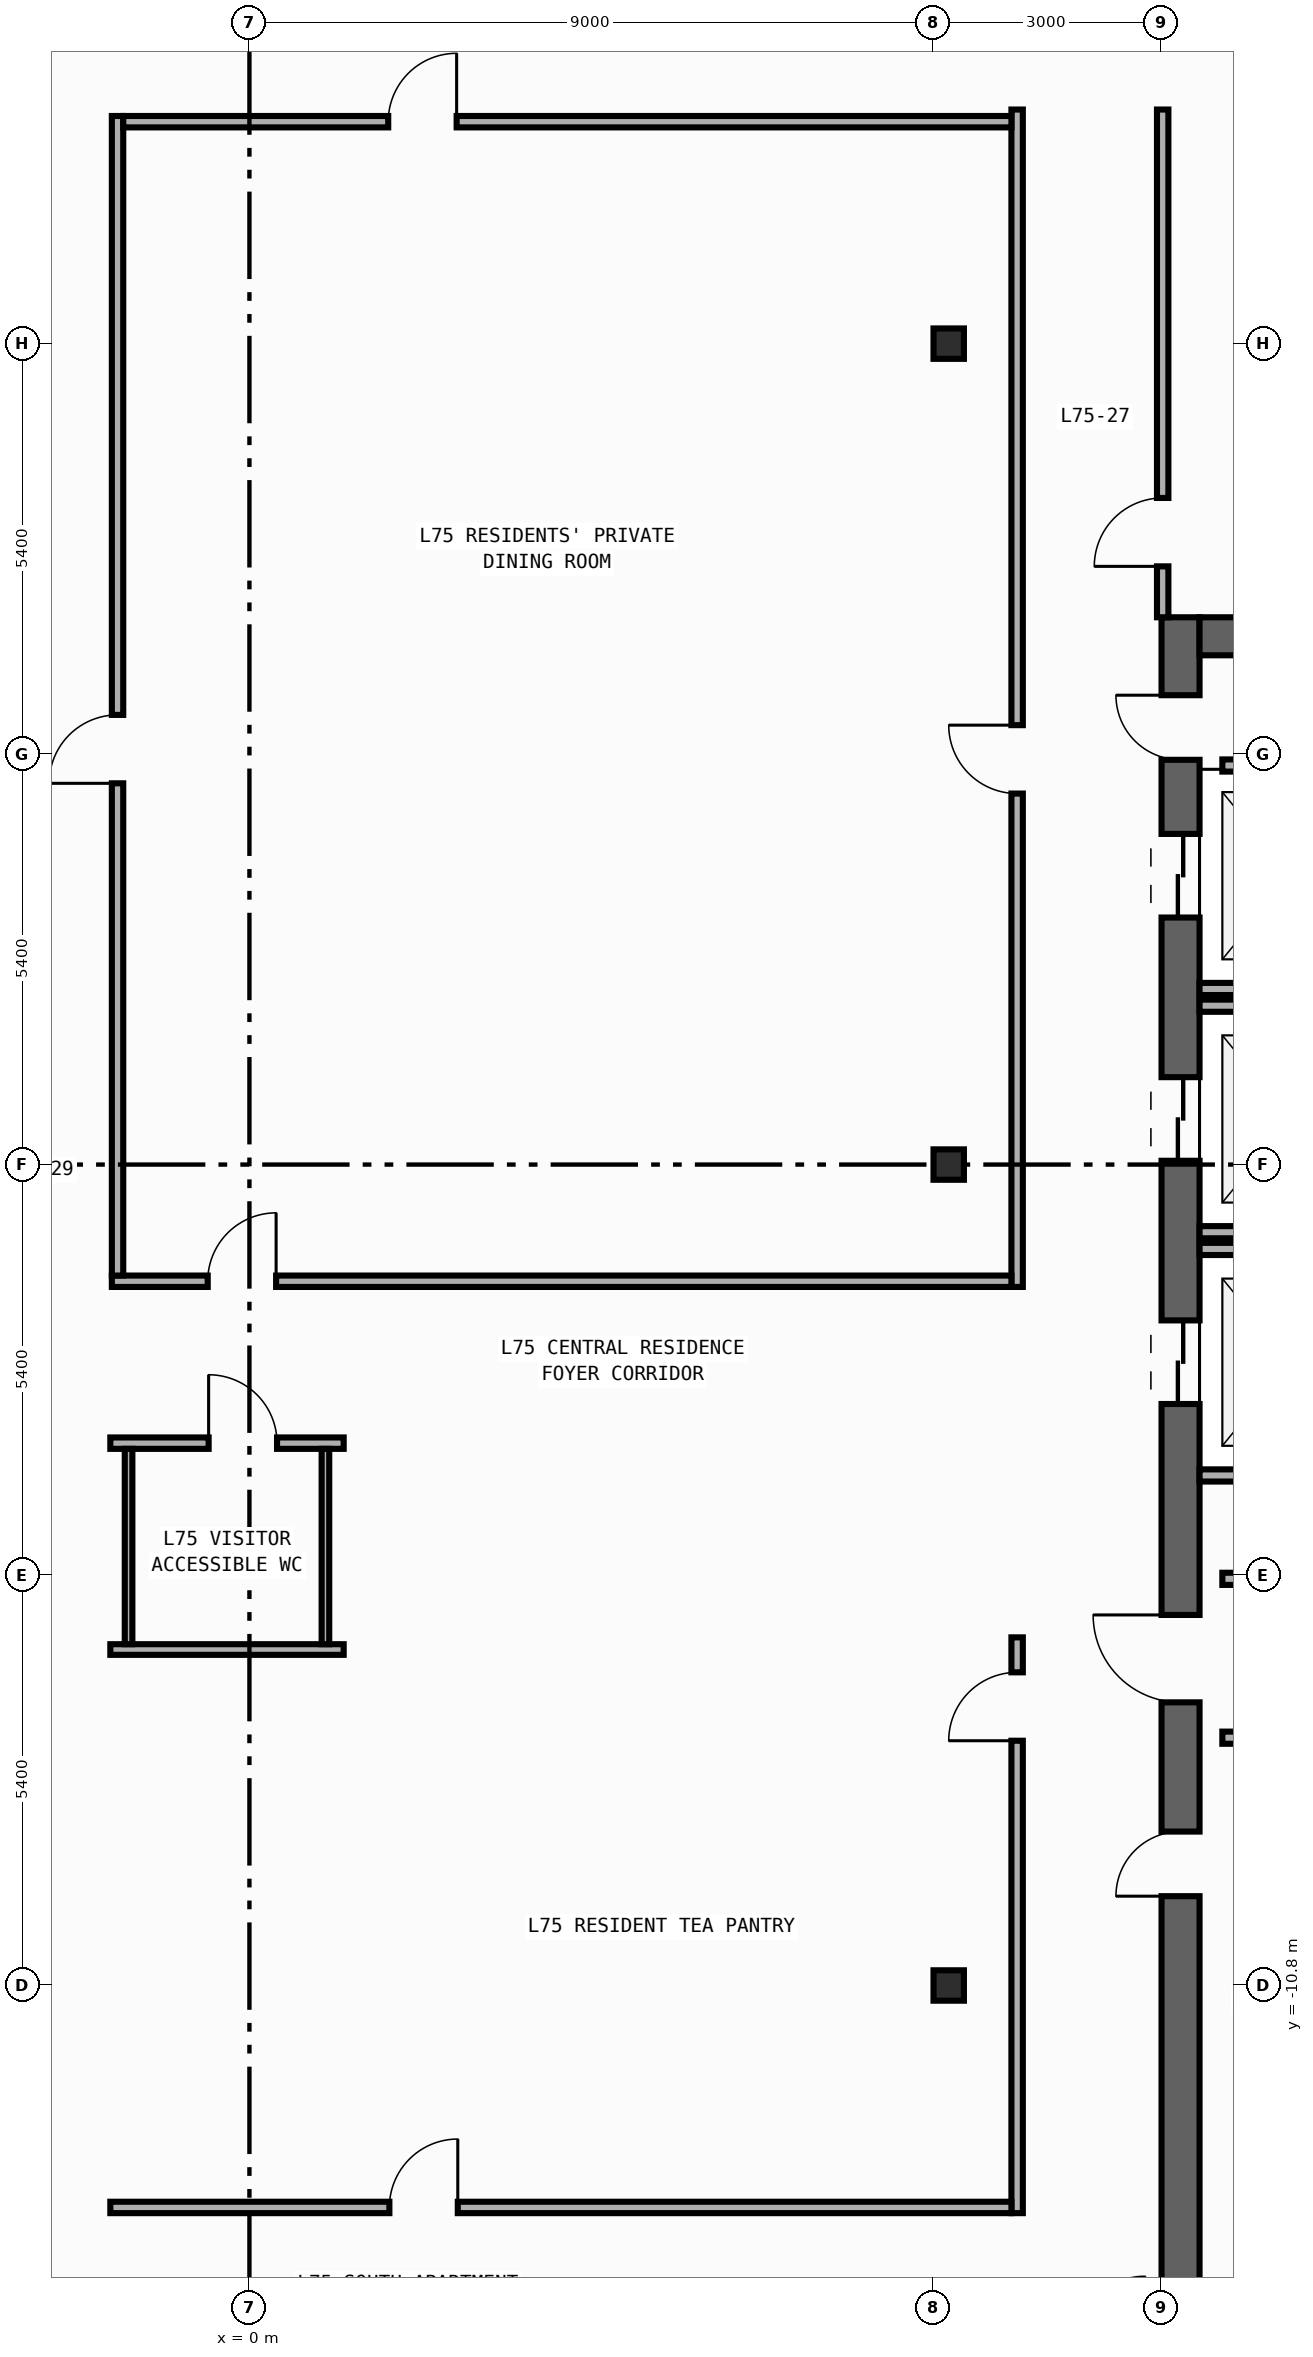
"""IFC4 building model, lengths in metres.
Left out: names, types, materials, properties, quantities, classifications, styles, units other than length and angle.
Written with IfcOpenShell. Run it as: python <this file> out.ifc"""

import sys

from ifc_helpers import new_model, si_unit, direction, frame, frame_2d, origin, origin_2d, place, context, subcontext, project, spatial, rectangle, i_section, extrude, element, fill, save


model = new_model("IFC4")
c1 = context("Model", 3, precision=1e-05, world=origin(), true_north=direction((0.0, 1.0)))
c2 = subcontext(c1, "Body", "Model", "MODEL_VIEW")
j1 = project(units=[si_unit("LENGTHUNIT", "METRE"), si_unit("PLANEANGLEUNIT", "RADIAN")], contexts=[c1])
p1 = place(None, origin())
s1 = spatial("IfcSite", under=j1, at=p1, CompositionType="ELEMENT")
p2 = place(p1, origin())
s2 = spatial("IfcBuilding", under=s1, at=p2, CompositionType="ELEMENT")
p3 = place(p2, frame((0.0, 0.0, 311.8)))
s3 = spatial("IfcBuildingStorey", under=s2, at=p3, CompositionType="ELEMENT", Elevation=311.8)
p4 = place(p3, frame((12.25, -19.8, 0.0), z_axis=(0.0, 0.0, 1.0), x_axis=(0.0, 1.0, 0.0)))
e1 = element("IfcWall", 1, at=p4, inside=s3, PredefinedType="SHEAR", context=c2, shape_type="SweptSolid", body=[
    extrude(rectangle(XDim=27.0, YDim=0.5, at=frame_2d((13.5, 0.0))), origin(), (0.0, 0.0, 1.0), 3.54),
])
p5 = place(p4, frame((23.05, 0.0, 0.0)))
e2 = element("IfcOpeningElement", 2, at=p5, cuts=e1, PredefinedType="OPENING", context=c2, shape_type="SweptSolid", body=[
    extrude(rectangle(XDim=1.1, YDim=2.2, at=frame_2d((0.55, 1.1))), frame((0.0, 0.26, 0.0), z_axis=(0.0, -1.0, 0.0), x_axis=(1.0, 0.0, 0.0)), (0.0, 0.0, 1.0), 0.52),
])
p6 = place(p4, frame((19.85, 0.0, 0.0)))
e3 = element("IfcOpeningElement", 3, at=p6, cuts=e1, PredefinedType="OPENING", context=c2, shape_type="SweptSolid", body=[
    extrude(rectangle(XDim=1.1, YDim=2.2, at=frame_2d((0.55, 1.1))), frame((0.0, 0.26, 0.0), z_axis=(0.0, -1.0, 0.0), x_axis=(1.0, 0.0, 0.0)), (0.0, 0.0, 1.0), 0.52),
])
p7 = place(p4, frame((16.65, 0.0, 0.0)))
e4 = element("IfcOpeningElement", 4, at=p7, cuts=e1, PredefinedType="OPENING", context=c2, shape_type="SweptSolid", body=[
    extrude(rectangle(XDim=1.1, YDim=2.2, at=frame_2d((0.55, 1.1))), frame((0.0, 0.26, 0.0), z_axis=(0.0, -1.0, 0.0), x_axis=(1.0, 0.0, 0.0)), (0.0, 0.0, 1.0), 0.52),
])
p8 = place(p4, frame((10.175, 0.0, 0.0)))
e5 = element("IfcOpeningElement", 5, at=p8, cuts=e1, PredefinedType="OPENING", context=c2, shape_type="SweptSolid", body=[
    extrude(rectangle(XDim=0.85, YDim=2.1, at=frame_2d((0.425, 1.05))), frame((0.0, 0.26, 0.0), z_axis=(0.0, -1.0, 0.0), x_axis=(1.0, 0.0, 0.0)), (0.0, 0.0, 1.0), 0.52),
])
p9 = place(p4, frame((12.725, 0.0, 0.0)))
e6 = element("IfcOpeningElement", 6, at=p9, cuts=e1, PredefinedType="OPENING", context=c2, shape_type="SweptSolid", body=[
    extrude(rectangle(XDim=1.15, YDim=2.2, at=frame_2d((0.575, 1.1))), frame((0.0, 0.26, 0.0), z_axis=(0.0, -1.0, 0.0), x_axis=(1.0, 0.0, 0.0)), (0.0, 0.0, 1.0), 0.52),
])
p10 = place(p4, frame((25.125, 0.0, 0.0)))
e7 = element("IfcOpeningElement", 7, at=p10, cuts=e1, PredefinedType="OPENING", context=c2, shape_type="SweptSolid", body=[
    extrude(rectangle(XDim=0.85, YDim=2.1, at=frame_2d((0.425, 1.05))), frame((0.0, 0.26, 0.0), z_axis=(0.0, -1.0, 0.0), x_axis=(1.0, 0.0, 0.0)), (0.0, 0.0, 1.0), 0.52),
])
p11 = place(p3, frame((12.5, 6.95, 0.0), z_axis=(0.0, 0.0, 1.0), x_axis=(1.0, 0.0, 0.0)))
e8 = element("IfcWall", 8, at=p11, inside=s3, PredefinedType="SHEAR", context=c2, shape_type="SweptSolid", body=[
    extrude(rectangle(XDim=7.4, YDim=0.5, at=frame_2d((3.7, 0.0))), origin(), (0.0, 0.0, 1.0), 3.54),
])
for number, where, z_axis, x_axis in (
    (9, (9.2, -10.8, 0.0), (0.0, 0.0, 1.0), (1.0, 0.0, 0.0)),
    (10, (9.2, 0.0, 0.0), (0.0, 0.0, 1.0), (1.0, 0.0, 0.0)),
    (11, (9.2, 10.8, 0.0), (0.0, 0.0, 1.0), (1.0, 0.0, 0.0)),
):
    element("IfcColumn", number, at=place(p3, frame(where, z_axis=z_axis, x_axis=x_axis)), inside=s3, PredefinedType="COLUMN", context=c2, shape_type="SweptSolid", body=[
        extrude(i_section(OverallWidth=0.4, OverallDepth=0.4, WebThickness=0.013, FlangeThickness=0.021, FilletRadius=0.022, at=origin_2d()), origin(), (0.0, 0.0, 1.0), 3.8),
    ])
for number, where, z_axis, x_axis in (
    (12, (12.5, 2.31, 0.0), (0.0, 0.0, 1.0), (1.0, 0.0, 0.0)),
    (13, (12.5, -0.89, 0.0), (0.0, 0.0, 1.0), (1.0, 0.0, 0.0)),
    (14, (12.5, 2.09, 0.0), (0.0, 0.0, 1.0), (1.0, 0.0, 0.0)),
    (15, (12.5, -4.09, 0.0), (0.0, 0.0, 1.0), (1.0, 0.0, 0.0)),
    (16, (12.5, -1.11, 0.0), (0.0, 0.0, 1.0), (1.0, 0.0, 0.0)),
):
    element("IfcWall", number, at=place(p3, frame(where, z_axis=z_axis, x_axis=x_axis)), inside=s3, PredefinedType="STANDARD", context=c2, shape_type="SweptSolid", body=[
        extrude(rectangle(XDim=2.49, YDim=0.16, at=frame_2d((1.245, 0.0))), origin(), (0.0, 0.0, 1.0), 3.54),
    ])
for number, where, z_axis, x_axis in (
    (17, (12.8, -5.45, 0.0), (0.0, 0.0, 1.0), (1.0, 0.0, 0.0)),
    (18, (12.8, -7.54, 0.0), (0.0, 0.0, 1.0), (1.0, 0.0, 0.0)),
    (19, (12.8, 5.25, 0.0), (0.0, 0.0, 1.0), (1.0, 0.0, 0.0)),
):
    element("IfcWall", number, at=place(p3, frame(where, z_axis=z_axis, x_axis=x_axis)), inside=s3, PredefinedType="STANDARD", context=c2, shape_type="SweptSolid", body=[
        extrude(rectangle(XDim=2.6, YDim=0.16, at=frame_2d((1.3, 0.0))), origin(), (0.0, 0.0, 1.0), 3.54),
    ])
p12 = place(p3, frame((12.015, 7.2, 0.0), z_axis=(0.0, 0.0, 1.0), x_axis=(0.0, 1.0, 0.0)))
e20 = element("IfcWall", 20, at=p12, inside=s3, PredefinedType="PARTITIONING", context=c2, shape_type="SweptSolid", body=[
    extrude(rectangle(XDim=6.68, YDim=0.15, at=frame_2d((3.34, 0.0))), origin(), (0.0, 0.0, 1.0), 3.54),
])
p13 = place(p12, frame((0.67, 0.0, 0.0)))
e21 = element("IfcOpeningElement", 21, at=p13, cuts=e20, PredefinedType="OPENING", context=c2, shape_type="SweptSolid", body=[
    extrude(rectangle(XDim=0.9, YDim=2.15, at=frame_2d((0.45, 1.075))), frame((0.0, 0.085, 0.0), z_axis=(0.0, -1.0, 0.0), x_axis=(1.0, 0.0, 0.0)), (0.0, 0.0, 1.0), 0.17),
])
p14 = place(p3, frame((10.1, -1.61, 0.0), z_axis=(0.0, 0.0, 1.0), x_axis=(0.0, 1.0, 0.0)))
e22 = element("IfcWall", 22, at=p14, inside=s3, PredefinedType="PARTITIONING", context=c2, shape_type="SweptSolid", body=[
    extrude(rectangle(XDim=15.49, YDim=0.15, at=frame_2d((7.745, 0.0))), origin(), (0.0, 0.0, 1.0), 3.54),
])
p15 = place(p14, frame((6.491, 0.0, 0.0)))
e23 = element("IfcOpeningElement", 23, at=p15, cuts=e22, PredefinedType="OPENING", context=c2, shape_type="SweptSolid", body=[
    extrude(rectangle(XDim=0.9, YDim=2.15, at=frame_2d((0.45, 1.075))), frame((0.0, 0.085, 0.0), z_axis=(0.0, -1.0, 0.0), x_axis=(1.0, 0.0, 0.0)), (0.0, 0.0, 1.0), 0.17),
])
p16 = place(p3, frame((10.1, -13.795, 0.0), z_axis=(0.0, 0.0, 1.0), x_axis=(0.0, 1.0, 0.0)))
e24 = element("IfcWall", 24, at=p16, inside=s3, PredefinedType="PARTITIONING", context=c2, shape_type="SweptSolid", body=[
    extrude(rectangle(XDim=7.575, YDim=0.15, at=frame_2d((3.788, 0.0))), origin(), (0.0, 0.0, 1.0), 3.54),
])
p17 = place(p16, frame((6.215, 0.0, 0.0)))
e25 = element("IfcOpeningElement", 25, at=p17, cuts=e24, PredefinedType="OPENING", context=c2, shape_type="SweptSolid", body=[
    extrude(rectangle(XDim=0.9, YDim=2.15, at=frame_2d((0.45, 1.075))), frame((0.0, 0.085, 0.0), z_axis=(0.0, -1.0, 0.0), x_axis=(1.0, 0.0, 0.0)), (0.0, 0.0, 1.0), 0.17),
])
p18 = place(p3, frame((-1.81, -1.535, 0.0), z_axis=(0.0, 0.0, 1.0), x_axis=(1.0, 0.0, 0.0)))
e26 = element("IfcWall", 26, at=p18, inside=s3, PredefinedType="PARTITIONING", context=c2, shape_type="SweptSolid", body=[
    extrude(rectangle(XDim=11.835, YDim=0.15, at=frame_2d((5.917, 0.0))), origin(), (0.0, 0.0, 1.0), 3.54),
])
p19 = place(p18, frame((1.261, 0.0, 0.0)))
e27 = element("IfcOpeningElement", 27, at=p19, cuts=e26, PredefinedType="OPENING", context=c2, shape_type="SweptSolid", body=[
    extrude(rectangle(XDim=0.9, YDim=2.15, at=frame_2d((0.45, 1.075))), frame((0.0, 0.085, 0.0), z_axis=(0.0, -1.0, 0.0), x_axis=(1.0, 0.0, 0.0)), (0.0, 0.0, 1.0), 0.17),
])
p20 = place(p3, frame((-1.83, -3.665, 0.0), z_axis=(0.0, 0.0, 1.0), x_axis=(1.0, 0.0, 0.0)))
e28 = element("IfcWall", 28, at=p20, inside=s3, PredefinedType="PARTITIONING", context=c2, shape_type="SweptSolid", body=[
    extrude(rectangle(XDim=3.07, YDim=0.15, at=frame_2d((1.535, 0.0))), origin(), (0.0, 0.0, 1.0), 3.54),
])
p21 = place(p20, frame((1.293, 0.0, 0.0)))
e29 = element("IfcOpeningElement", 29, at=p21, cuts=e28, PredefinedType="OPENING", context=c2, shape_type="SweptSolid", body=[
    extrude(rectangle(XDim=0.9, YDim=2.15, at=frame_2d((0.45, 1.075))), frame((0.0, 0.085, 0.0), z_axis=(0.0, -1.0, 0.0), x_axis=(1.0, 0.0, 0.0)), (0.0, 0.0, 1.0), 0.17),
])
p22 = place(p3, frame((-1.735, -1.46, 0.0), z_axis=(0.0, 0.0, 1.0), x_axis=(0.0, 1.0, 0.0)))
e30 = element("IfcWall", 30, at=p22, inside=s3, PredefinedType="PARTITIONING", context=c2, shape_type="SweptSolid", body=[
    extrude(rectangle(XDim=15.255, YDim=0.15, at=frame_2d((7.627, 0.0))), origin(), (0.0, 0.0, 1.0), 3.54),
])
p23 = place(p22, frame((6.476, 0.0, 0.0)))
e31 = element("IfcOpeningElement", 31, at=p23, cuts=e30, PredefinedType="OPENING", context=c2, shape_type="SweptSolid", body=[
    extrude(rectangle(XDim=0.9, YDim=2.15, at=frame_2d((0.45, 1.075))), frame((0.0, 0.085, 0.0), z_axis=(0.0, -1.0, 0.0), x_axis=(1.0, 0.0, 0.0)), (0.0, 0.0, 1.0), 0.17),
])
p24 = place(p3, frame((-1.66, 13.72, 0.0), z_axis=(0.0, 0.0, 1.0), x_axis=(1.0, 0.0, 0.0)))
e32 = element("IfcWall", 32, at=p24, inside=s3, PredefinedType="PARTITIONING", context=c2, shape_type="SweptSolid", body=[
    extrude(rectangle(XDim=11.685, YDim=0.15, at=frame_2d((5.842, 0.0))), origin(), (0.0, 0.0, 1.0), 3.54),
])
p25 = place(p24, frame((3.486, 0.0, 0.0)))
e33 = element("IfcOpeningElement", 33, at=p25, cuts=e32, PredefinedType="OPENING", context=c2, shape_type="SweptSolid", body=[
    extrude(rectangle(XDim=0.9, YDim=2.15, at=frame_2d((0.45, 1.075))), frame((0.0, 0.085, 0.0), z_axis=(0.0, -1.0, 0.0), x_axis=(1.0, 0.0, 0.0)), (0.0, 0.0, 1.0), 0.17),
])
p26 = place(p3, frame((-1.83, -13.72, 0.0), z_axis=(0.0, 0.0, 1.0), x_axis=(1.0, 0.0, 0.0)))
e34 = element("IfcWall", 34, at=p26, inside=s3, PredefinedType="PARTITIONING", context=c2, shape_type="SweptSolid", body=[
    extrude(rectangle(XDim=11.855, YDim=0.15, at=frame_2d((5.927, 0.0))), origin(), (0.0, 0.0, 1.0), 3.54),
])
p27 = place(p26, frame((3.671, 0.0, 0.0)))
e35 = element("IfcOpeningElement", 35, at=p27, cuts=e34, PredefinedType="OPENING", context=c2, shape_type="SweptSolid", body=[
    extrude(rectangle(XDim=0.9, YDim=2.15, at=frame_2d((0.45, 1.075))), frame((0.0, 0.085, 0.0), z_axis=(0.0, -1.0, 0.0), x_axis=(1.0, 0.0, 0.0)), (0.0, 0.0, 1.0), 0.17),
])
p28 = place(p3, frame((-1.83, -6.38, 0.0), z_axis=(0.0, 0.0, 1.0), x_axis=(1.0, 0.0, 0.0)))
e36 = element("IfcWall", 36, at=p28, inside=s3, PredefinedType="PARTITIONING", context=c2, shape_type="SweptSolid", body=[
    extrude(rectangle(XDim=3.07, YDim=0.14, at=frame_2d((1.535, 0.0))), origin(), (0.0, 0.0, 1.0), 3.54),
])
for number, where, z_axis, x_axis in (
    (37, (1.0, -3.74, 0.0), (0.0, 0.0, 1.0), (0.0, -1.0, 0.0)),
    (38, (-1.59, -6.31, 0.0), (0.0, 0.0, 1.0), (0.0, 1.0, 0.0)),
):
    element("IfcWall", number, at=place(p3, frame(where, z_axis=z_axis, x_axis=x_axis)), inside=s3, PredefinedType="PARTITIONING", context=c2, shape_type="SweptSolid", body=[
        extrude(rectangle(XDim=2.57, YDim=0.1, at=frame_2d((1.285, 0.0))), origin(), (0.0, 0.0, 1.0), 3.54),
    ])
p29 = place(p5, origin())
e39 = element("IfcDoor", 39, at=p29, inside=s3, OperationType="DOUBLE_DOOR_SLIDING", PredefinedType="DOOR", context=c2, shape_type="SweptSolid", body=[
    extrude(rectangle(XDim=1.1, YDim=2.2, at=frame_2d((0.55, 1.1))), frame((0.0, 0.025, 0.0), z_axis=(0.0, -1.0, 0.0), x_axis=(1.0, 0.0, 0.0)), (0.0, 0.0, 1.0), 0.05),
])
fill(e2, e39)
p30 = place(p6, origin())
e40 = element("IfcDoor", 40, at=p30, inside=s3, OperationType="DOUBLE_DOOR_SLIDING", PredefinedType="DOOR", context=c2, shape_type="SweptSolid", body=[
    extrude(rectangle(XDim=1.1, YDim=2.2, at=frame_2d((0.55, 1.1))), frame((0.0, 0.025, 0.0), z_axis=(0.0, -1.0, 0.0), x_axis=(1.0, 0.0, 0.0)), (0.0, 0.0, 1.0), 0.05),
])
fill(e3, e40)
p31 = place(p7, origin())
e41 = element("IfcDoor", 41, at=p31, inside=s3, OperationType="DOUBLE_DOOR_SLIDING", PredefinedType="DOOR", context=c2, shape_type="SweptSolid", body=[
    extrude(rectangle(XDim=1.1, YDim=2.2, at=frame_2d((0.55, 1.1))), frame((0.0, 0.025, 0.0), z_axis=(0.0, -1.0, 0.0), x_axis=(1.0, 0.0, 0.0)), (0.0, 0.0, 1.0), 0.05),
])
fill(e4, e41)
p32 = place(p8, origin())
e42 = element("IfcDoor", 42, at=p32, inside=s3, OperationType="SINGLE_SWING_LEFT", PredefinedType="DOOR", context=c2, shape_type="SweptSolid", body=[
    extrude(rectangle(XDim=0.85, YDim=2.1, at=frame_2d((0.425, 1.05))), frame((0.0, 0.025, 0.0), z_axis=(0.0, -1.0, 0.0), x_axis=(1.0, 0.0, 0.0)), (0.0, 0.0, 1.0), 0.05),
])
fill(e5, e42)
p33 = place(p9, origin())
e43 = element("IfcDoor", 43, at=p33, inside=s3, OperationType="SINGLE_SWING_RIGHT", PredefinedType="DOOR", context=c2, shape_type="SweptSolid", body=[
    extrude(rectangle(XDim=1.15, YDim=2.2, at=frame_2d((0.575, 1.1))), frame((0.0, 0.025, 0.0), z_axis=(0.0, -1.0, 0.0), x_axis=(1.0, 0.0, 0.0)), (0.0, 0.0, 1.0), 0.05),
])
fill(e6, e43)
p34 = place(p10, origin())
e44 = element("IfcDoor", 44, at=p34, inside=s3, OperationType="SINGLE_SWING_RIGHT", PredefinedType="DOOR", context=c2, shape_type="SweptSolid", body=[
    extrude(rectangle(XDim=0.85, YDim=2.1, at=frame_2d((0.425, 1.05))), frame((0.0, 0.025, 0.0), z_axis=(0.0, -1.0, 0.0), x_axis=(1.0, 0.0, 0.0)), (0.0, 0.0, 1.0), 0.05),
])
fill(e7, e44)
p35 = place(p13, origin())
e45 = element("IfcDoor", 45, at=p35, inside=s3, OperationType="SINGLE_SWING_LEFT", PredefinedType="DOOR", context=c2, shape_type="SweptSolid", body=[
    extrude(rectangle(XDim=0.9, YDim=2.15, at=frame_2d((0.45, 1.075))), frame((0.0, 0.025, 0.0), z_axis=(0.0, -1.0, 0.0), x_axis=(1.0, 0.0, 0.0)), (0.0, 0.0, 1.0), 0.05),
])
fill(e21, e45)
p36 = place(p15, origin())
e46 = element("IfcDoor", 46, at=p36, inside=s3, OperationType="SINGLE_SWING_RIGHT", PredefinedType="DOOR", context=c2, shape_type="SweptSolid", body=[
    extrude(rectangle(XDim=0.9, YDim=2.15, at=frame_2d((0.45, 1.075))), frame((0.0, 0.025, 0.0), z_axis=(0.0, -1.0, 0.0), x_axis=(1.0, 0.0, 0.0)), (0.0, 0.0, 1.0), 0.05),
])
fill(e23, e46)
p37 = place(p17, origin())
e47 = element("IfcDoor", 47, at=p37, inside=s3, OperationType="SINGLE_SWING_LEFT", PredefinedType="DOOR", context=c2, shape_type="SweptSolid", body=[
    extrude(rectangle(XDim=0.9, YDim=2.15, at=frame_2d((0.45, 1.075))), frame((0.0, 0.025, 0.0), z_axis=(0.0, -1.0, 0.0), x_axis=(1.0, 0.0, 0.0)), (0.0, 0.0, 1.0), 0.05),
])
fill(e25, e47)
p38 = place(p19, origin())
e48 = element("IfcDoor", 48, at=p38, inside=s3, OperationType="SINGLE_SWING_RIGHT", PredefinedType="DOOR", context=c2, shape_type="SweptSolid", body=[
    extrude(rectangle(XDim=0.9, YDim=2.15, at=frame_2d((0.45, 1.075))), frame((0.0, 0.025, 0.0), z_axis=(0.0, -1.0, 0.0), x_axis=(1.0, 0.0, 0.0)), (0.0, 0.0, 1.0), 0.05),
])
fill(e27, e48)
p39 = place(p21, origin())
e49 = element("IfcDoor", 49, at=p39, inside=s3, OperationType="SINGLE_SWING_LEFT", PredefinedType="DOOR", context=c2, shape_type="SweptSolid", body=[
    extrude(rectangle(XDim=0.9, YDim=2.15, at=frame_2d((0.45, 1.075))), frame((0.0, 0.025, 0.0), z_axis=(0.0, -1.0, 0.0), x_axis=(1.0, 0.0, 0.0)), (0.0, 0.0, 1.0), 0.05),
])
fill(e29, e49)
p40 = place(p23, origin())
e50 = element("IfcDoor", 50, at=p40, inside=s3, OperationType="SINGLE_SWING_LEFT", PredefinedType="DOOR", context=c2, shape_type="SweptSolid", body=[
    extrude(rectangle(XDim=0.9, YDim=2.15, at=frame_2d((0.45, 1.075))), frame((0.0, 0.025, 0.0), z_axis=(0.0, -1.0, 0.0), x_axis=(1.0, 0.0, 0.0)), (0.0, 0.0, 1.0), 0.05),
])
fill(e31, e50)
p41 = place(p25, origin())
e51 = element("IfcDoor", 51, at=p41, inside=s3, OperationType="SINGLE_SWING_RIGHT", PredefinedType="DOOR", context=c2, shape_type="SweptSolid", body=[
    extrude(rectangle(XDim=0.9, YDim=2.15, at=frame_2d((0.45, 1.075))), frame((0.0, 0.025, 0.0), z_axis=(0.0, -1.0, 0.0), x_axis=(1.0, 0.0, 0.0)), (0.0, 0.0, 1.0), 0.05),
])
fill(e33, e51)
p42 = place(p27, origin())
e52 = element("IfcDoor", 52, at=p42, inside=s3, OperationType="SINGLE_SWING_RIGHT", PredefinedType="DOOR", context=c2, shape_type="SweptSolid", body=[
    extrude(rectangle(XDim=0.9, YDim=2.15, at=frame_2d((0.45, 1.075))), frame((0.0, 0.025, 0.0), z_axis=(0.0, -1.0, 0.0), x_axis=(1.0, 0.0, 0.0)), (0.0, 0.0, 1.0), 0.05),
])
fill(e35, e52)
save(model, sys.argv[1])
